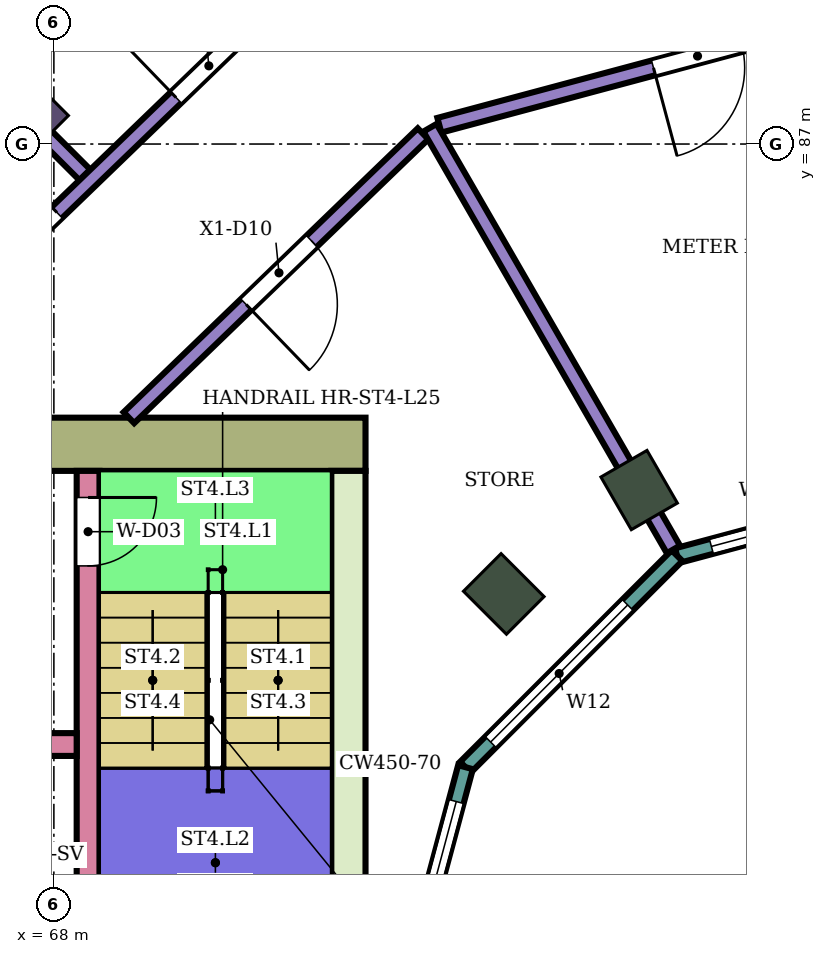
"""IFC4 building model, lengths in metres.
Left out: names, types, materials, properties, quantities, classifications, styles, units other than length and angle.
Written with IfcOpenShell. Run it as: python <this file> out.ifc"""

import sys

from ifc_helpers import new_model, si_unit, direction, frame, frame_2d, origin, origin_2d, place, context, subcontext, project, spatial, rectangle, extrude, element, fill, save


model = new_model("IFC4")
c1 = context("Model", 3, precision=1e-05, world=origin(), true_north=direction((0.0, 1.0)))
c2 = subcontext(c1, "Body", "Model", "MODEL_VIEW")
j1 = project(units=[si_unit("LENGTHUNIT", "METRE"), si_unit("PLANEANGLEUNIT", "RADIAN")], contexts=[c1])
p1 = place(None, origin())
s1 = spatial("IfcSite", under=j1, at=p1, CompositionType="ELEMENT")
p2 = place(p1, origin())
s2 = spatial("IfcBuilding", under=s1, at=p2, CompositionType="ELEMENT")
p3 = place(p2, frame((0.0, 0.0, 109.0)))
s3 = spatial("IfcBuildingStorey", under=s2, at=p3, CompositionType="ELEMENT", Elevation=109.0)
p4 = place(p3, frame((67.555, 87.445, 0.0), z_axis=(0.0, 0.0, 1.0), x_axis=(-0.707106781187, 0.707106781187, 0.0)))
e1 = element("IfcColumn", 1, at=p4, inside=s3, PredefinedType="COLUMN", context=c2, shape_type="SweptSolid", body=[
    extrude(rectangle(XDim=1.0, YDim=0.8, at=origin_2d()), origin(), (0.0, 0.0, 1.0), 5.6),
])
for number, where, z_axis, x_axis in (
    (2, (75.7, 82.448, 0.0), (0.0, 0.0, 1.0), (-0.5, 0.866, 0.0)),
    (3, (73.919, 81.081, 0.0), (0.0, 0.0, 1.0), (-0.707, 0.707, 0.0)),
):
    element("IfcColumn", number, at=place(p3, frame(where, z_axis=z_axis, x_axis=x_axis)), inside=s3, PredefinedType="COLUMN", context=c2, shape_type="SweptSolid", body=[
        extrude(rectangle(XDim=0.8, YDim=0.7, at=origin_2d()), origin(), (0.0, 0.0, 1.0), 5.6),
    ])
p5 = place(p3, frame((72.1, 83.05, 0.0), z_axis=(0.0, 0.0, 1.0), x_axis=(-1.0, 0.0, 0.0)))
e4 = element("IfcWall", 4, at=p5, inside=s3, PredefinedType="SHEAR", context=c2, shape_type="SweptSolid", body=[
    extrude(rectangle(XDim=14.8, YDim=0.7, at=frame_2d((7.4, 0.0))), origin(), (0.0, 0.0, 1.0), 5.28),
])
p6 = place(p5, frame((4.2, 0.0, 0.0)))
e5 = element("IfcOpeningElement", 5, at=p6, cuts=e4, PredefinedType="OPENING", context=c2, shape_type="SweptSolid", body=[
    extrude(rectangle(XDim=2.4, YDim=2.4, at=frame_2d((1.2, 1.2))), frame((0.0, 0.36, 0.0), z_axis=(0.0, -1.0, 0.0), x_axis=(1.0, 0.0, 0.0)), (0.0, 0.0, 1.0), 0.72),
])
p7 = place(p3, frame((71.875, 82.7, 0.0), z_axis=(0.0, 0.0, 1.0), x_axis=(0.0, -1.0, 0.0)))
e6 = element("IfcWall", 6, at=p7, inside=s3, PredefinedType="SHEAR", context=c2, shape_type="SweptSolid", body=[
    extrude(rectangle(XDim=7.7, YDim=0.45, at=frame_2d((3.85, 0.0))), origin(), (0.0, 0.0, 1.0), 5.28),
])
p8 = place(p3, frame((68.45, 82.7, 0.0), z_axis=(0.0, 0.0, 1.0), x_axis=(0.0, -1.0, 0.0)))
e7 = element("IfcWall", 7, at=p8, inside=s3, PredefinedType="SHEAR", context=c2, shape_type="SweptSolid", body=[
    extrude(rectangle(XDim=7.7, YDim=0.3, at=frame_2d((3.85, 0.0))), origin(), (0.0, 0.0, 1.0), 5.28),
])
p9 = place(p8, frame((0.35, 0.0, 0.0)))
e8 = element("IfcOpeningElement", 8, at=p9, cuts=e7, PredefinedType="OPENING", context=c2, shape_type="SweptSolid", body=[
    extrude(rectangle(XDim=0.9, YDim=2.1, at=frame_2d((0.45, 1.05))), frame((0.0, 0.16, 0.0), z_axis=(0.0, -1.0, 0.0), x_axis=(1.0, 0.0, 0.0)), (0.0, 0.0, 1.0), 0.32),
])
p10 = place(p3, frame((68.3, 79.1, 0.0), z_axis=(0.0, 0.0, 1.0), x_axis=(-1.0, 0.0, 0.0)))
e9 = element("IfcWall", 9, at=p10, inside=s3, PredefinedType="SHEAR", context=c2, shape_type="SweptSolid", body=[
    extrude(rectangle(XDim=11.0, YDim=0.3, at=frame_2d((5.5, 0.0))), origin(), (0.0, 0.0, 1.0), 5.28),
])
p11 = place(p10, frame((0.4, 0.0, 0.0)))
e10 = element("IfcOpeningElement", 10, at=p11, cuts=e9, PredefinedType="OPENING", context=c2, shape_type="SweptSolid", body=[
    extrude(rectangle(XDim=1.4, YDim=2.1, at=frame_2d((0.7, 1.05))), frame((0.0, 0.16, 0.0), z_axis=(0.0, -1.0, 0.0), x_axis=(1.0, 0.0, 0.0)), (0.0, 0.0, 1.0), 0.32),
])
p12 = place(p10, frame((5.4, 0.0, 0.0)))
e11 = element("IfcOpeningElement", 11, at=p12, cuts=e9, PredefinedType="OPENING", context=c2, shape_type="SweptSolid", body=[
    extrude(rectangle(XDim=1.4, YDim=2.1, at=frame_2d((0.7, 1.05))), frame((0.0, 0.16, 0.0), z_axis=(0.0, -1.0, 0.0), x_axis=(1.0, 0.0, 0.0)), (0.0, 0.0, 1.0), 0.32),
])
p13 = place(p10, frame((8.1, 0.0, 0.0)))
e12 = element("IfcOpeningElement", 12, at=p13, cuts=e9, PredefinedType="OPENING", context=c2, shape_type="SweptSolid", body=[
    extrude(rectangle(XDim=1.0, YDim=2.1, at=frame_2d((0.5, 1.05))), frame((0.0, 0.16, 0.0), z_axis=(0.0, -1.0, 0.0), x_axis=(1.0, 0.0, 0.0)), (0.0, 0.0, 1.0), 0.32),
])
p14 = place(p3, frame((80.0, 82.604, 0.0), z_axis=(0.0, 0.0, 1.0), x_axis=(-0.965933654434, -0.258789828301, 0.0)))
e13 = element("IfcWall", 13, at=p14, inside=s3, PredefinedType="NOTDEFINED", context=c2, shape_type="SweptSolid", body=[
    extrude(rectangle(XDim=3.936, YDim=0.2, at=frame_2d((1.968, 0.0))), origin(), (0.0, 0.0, 1.0), 5.6),
])
p15 = place(p14, frame((2.118, 0.0, 0.9)))
e14 = element("IfcOpeningElement", 14, at=p15, cuts=e13, PredefinedType="OPENING", context=c2, shape_type="SweptSolid", body=[
    extrude(rectangle(XDim=1.35, YDim=2.3, at=frame_2d((0.675, 1.15))), frame((0.0, 0.11, 0.0), z_axis=(0.0, -1.0, 0.0), x_axis=(1.0, 0.0, 0.0)), (0.0, 0.0, 1.0), 0.22),
])
p16 = place(p3, frame((76.198, 81.585, 0.0), z_axis=(0.0, 0.0, 1.0), x_axis=(-0.707106781187, -0.707106781187, 0.0)))
e15 = element("IfcWall", 15, at=p16, inside=s3, PredefinedType="NOTDEFINED", context=c2, shape_type="SweptSolid", body=[
    extrude(rectangle(XDim=3.936, YDim=0.2, at=frame_2d((1.968, 0.0))), origin(), (0.0, 0.0, 1.0), 5.6),
])
p17 = place(p16, frame((0.918, 0.0, 0.9)))
e16 = element("IfcOpeningElement", 16, at=p17, cuts=e15, PredefinedType="OPENING", context=c2, shape_type="SweptSolid", body=[
    extrude(rectangle(XDim=2.55, YDim=2.3, at=frame_2d((1.275, 1.15))), frame((0.0, 0.11, 0.0), z_axis=(0.0, -1.0, 0.0), x_axis=(1.0, 0.0, 0.0)), (0.0, 0.0, 1.0), 0.22),
])
p18 = place(p3, frame((73.415, 78.802, 0.0), z_axis=(0.0, 0.0, 1.0), x_axis=(-0.258789828301, -0.965933654434, 0.0)))
e17 = element("IfcWall", 17, at=p18, inside=s3, PredefinedType="NOTDEFINED", context=c2, shape_type="SweptSolid", body=[
    extrude(rectangle(XDim=3.936, YDim=0.2, at=frame_2d((1.968, 0.0))), origin(), (0.0, 0.0, 1.0), 5.6),
])
p19 = place(p18, frame((0.468, 0.0, 0.9)))
e18 = element("IfcOpeningElement", 18, at=p19, cuts=e17, PredefinedType="OPENING", context=c2, shape_type="SweptSolid", body=[
    extrude(rectangle(XDim=3.0, YDim=2.3, at=frame_2d((1.5, 1.15))), frame((0.0, 0.11, 0.0), z_axis=(0.0, -1.0, 0.0), x_axis=(1.0, 0.0, 0.0)), (0.0, 0.0, 1.0), 0.22),
])
p20 = place(p3, frame((63.597, 91.406, 0.0), z_axis=(0.0, 0.0, 1.0), x_axis=(0.707035026478, -0.707178528614, 0.0)))
e19 = element("IfcWall", 19, at=p20, inside=s3, PredefinedType="PARTITIONING", context=c2, shape_type="SweptSolid", body=[
    extrude(rectangle(XDim=6.805, YDim=0.2, at=frame_2d((3.403, 0.0))), origin(), (0.0, 0.0, 1.0), 5.15),
])
p21 = place(p3, frame((66.84, 84.941, 0.0), z_axis=(0.0, 0.0, 1.0), x_axis=(0.719566481028, 0.694423559062, 0.0)))
e20 = element("IfcWall", 20, at=p21, inside=s3, PredefinedType="PARTITIONING", context=c2, shape_type="SweptSolid", body=[
    extrude(rectangle(XDim=6.525, YDim=0.2, at=frame_2d((3.263, 0.0))), origin(), (0.0, 0.0, 1.0), 5.15),
])
p22 = place(p21, frame((3.846, 0.0, 0.0)))
e21 = element("IfcOpeningElement", 21, at=p22, cuts=e20, PredefinedType="OPENING", context=c2, shape_type="SweptSolid", body=[
    extrude(rectangle(XDim=1.2, YDim=2.4, at=frame_2d((0.6, 1.2))), frame((0.0, 0.11, 0.0), z_axis=(0.0, -1.0, 0.0), x_axis=(1.0, 0.0, 0.0)), (0.0, 0.0, 1.0), 0.22),
])
p23 = place(p21, frame((0.568, 0.0, 0.0)))
e22 = element("IfcOpeningElement", 22, at=p23, cuts=e20, PredefinedType="OPENING", context=c2, shape_type="SweptSolid", body=[
    extrude(rectangle(XDim=1.1, YDim=2.1, at=frame_2d((0.55, 1.05))), frame((0.0, 0.11, 0.0), z_axis=(0.0, -1.0, 0.0), x_axis=(1.0, 0.0, 0.0)), (0.0, 0.0, 1.0), 0.22),
])
p24 = place(p3, frame((68.987, 83.4, 0.0), z_axis=(0.0, 0.0, 1.0), x_axis=(0.719547721855, 0.694442996922, 0.0)))
e23 = element("IfcWall", 23, at=p24, inside=s3, PredefinedType="PARTITIONING", context=c2, shape_type="SweptSolid", body=[
    extrude(rectangle(XDim=5.378, YDim=0.2, at=frame_2d((2.689, 0.0))), origin(), (0.0, 0.0, 1.0), 5.15),
])
p25 = place(p24, frame((2.144, 0.0, 0.0)))
e24 = element("IfcOpeningElement", 24, at=p25, cuts=e23, PredefinedType="OPENING", context=c2, shape_type="SweptSolid", body=[
    extrude(rectangle(XDim=1.2, YDim=2.4, at=frame_2d((0.6, 1.2))), frame((0.0, 0.11, 0.0), z_axis=(0.0, -1.0, 0.0), x_axis=(1.0, 0.0, 0.0)), (0.0, 0.0, 1.0), 0.22),
])
p26 = place(p3, frame((73.071, 87.247, 0.0), z_axis=(0.0, 0.0, 1.0), x_axis=(0.965914318977, 0.258861987157, 0.0)))
e25 = element("IfcWall", 25, at=p26, inside=s3, PredefinedType="PARTITIONING", context=c2, shape_type="SweptSolid", body=[
    extrude(rectangle(XDim=7.043, YDim=0.2, at=frame_2d((3.521, 0.0))), origin(), (0.0, 0.0, 1.0), 5.15),
])
p27 = place(p26, frame((2.917, 0.0, 0.0)))
e26 = element("IfcOpeningElement", 26, at=p27, cuts=e25, PredefinedType="OPENING", context=c2, shape_type="SweptSolid", body=[
    extrude(rectangle(XDim=1.2, YDim=2.4, at=frame_2d((0.6, 1.2))), frame((0.0, 0.11, 0.0), z_axis=(0.0, -1.0, 0.0), x_axis=(1.0, 0.0, 0.0)), (0.0, 0.0, 1.0), 0.22),
])
p28 = place(p3, frame((72.948, 87.214, 0.0), z_axis=(0.0, 0.0, 1.0), x_axis=(0.500000701339, -0.866024998866, 0.0)))
e27 = element("IfcWall", 27, at=p28, inside=s3, PredefinedType="PARTITIONING", context=c2, shape_type="SweptSolid", body=[
    extrude(rectangle(XDim=6.405, YDim=0.2, at=frame_2d((3.203, 0.0))), origin(), (0.0, 0.0, 1.0), 5.15),
])
p29 = place(p15, origin())
e28 = element("IfcWindow", 28, at=p29, inside=s3, PartitioningType="SINGLE_PANEL", PredefinedType="WINDOW", context=c2, shape_type="SweptSolid", body=[
    extrude(rectangle(XDim=1.35, YDim=2.3, at=frame_2d((0.675, 1.15))), frame((0.0, 0.03, 0.0), z_axis=(0.0, -1.0, 0.0), x_axis=(1.0, 0.0, 0.0)), (0.0, 0.0, 1.0), 0.06),
])
fill(e14, e28)
p30 = place(p17, origin())
e29 = element("IfcWindow", 29, at=p30, inside=s3, PartitioningType="SINGLE_PANEL", PredefinedType="WINDOW", context=c2, shape_type="SweptSolid", body=[
    extrude(rectangle(XDim=2.55, YDim=2.3, at=frame_2d((1.275, 1.15))), frame((0.0, 0.03, 0.0), z_axis=(0.0, -1.0, 0.0), x_axis=(1.0, 0.0, 0.0)), (0.0, 0.0, 1.0), 0.06),
])
fill(e16, e29)
p31 = place(p19, origin())
e30 = element("IfcWindow", 30, at=p31, inside=s3, PartitioningType="SINGLE_PANEL", PredefinedType="WINDOW", context=c2, shape_type="SweptSolid", body=[
    extrude(rectangle(XDim=3.0, YDim=2.3, at=frame_2d((1.5, 1.15))), frame((0.0, 0.03, 0.0), z_axis=(0.0, -1.0, 0.0), x_axis=(1.0, 0.0, 0.0)), (0.0, 0.0, 1.0), 0.06),
])
fill(e18, e30)
p32 = place(p22, origin())
e31 = element("IfcDoor", 31, at=p32, inside=s3, OperationType="SINGLE_SWING_LEFT", PredefinedType="DOOR", context=c2, shape_type="SweptSolid", body=[
    extrude(rectangle(XDim=1.2, YDim=2.4, at=frame_2d((0.6, 1.2))), frame((0.0, 0.025, 0.0), z_axis=(0.0, -1.0, 0.0), x_axis=(1.0, 0.0, 0.0)), (0.0, 0.0, 1.0), 0.05),
])
fill(e21, e31)
p33 = place(p23, origin())
e32 = element("IfcDoor", 32, at=p33, inside=s3, OperationType="SINGLE_SWING_RIGHT", PredefinedType="DOOR", context=c2, shape_type="SweptSolid", body=[
    extrude(rectangle(XDim=1.1, YDim=2.1, at=frame_2d((0.55, 1.05))), frame((0.0, 0.025, 0.0), z_axis=(0.0, -1.0, 0.0), x_axis=(1.0, 0.0, 0.0)), (0.0, 0.0, 1.0), 0.05),
])
fill(e22, e32)
p34 = place(p27, frame((1.2, 0.0, 0.0), z_axis=(0.0, 0.0, 1.0), x_axis=(-1.0, 0.0, 0.0)))
e33 = element("IfcDoor", 33, at=p34, inside=s3, OperationType="SINGLE_SWING_RIGHT", PredefinedType="DOOR", context=c2, shape_type="SweptSolid", body=[
    extrude(rectangle(XDim=1.2, YDim=2.4, at=frame_2d((0.6, 1.2))), frame((0.0, 0.025, 0.0), z_axis=(0.0, -1.0, 0.0), x_axis=(1.0, 0.0, 0.0)), (0.0, 0.0, 1.0), 0.05),
])
fill(e26, e33)
p35 = place(p25, frame((1.2, 0.0, 0.0), z_axis=(0.0, 0.0, 1.0), x_axis=(-1.0, 0.0, 0.0)))
e34 = element("IfcDoor", 34, at=p35, inside=s3, OperationType="SINGLE_SWING_RIGHT", PredefinedType="DOOR", context=c2, shape_type="SweptSolid", body=[
    extrude(rectangle(XDim=1.2, YDim=2.4, at=frame_2d((0.6, 1.2))), frame((0.0, 0.025, 0.0), z_axis=(0.0, -1.0, 0.0), x_axis=(1.0, 0.0, 0.0)), (0.0, 0.0, 1.0), 0.05),
])
fill(e24, e34)
p36 = place(p9, origin())
e35 = element("IfcDoor", 35, at=p36, inside=s3, OperationType="SINGLE_SWING_LEFT", PredefinedType="DOOR", context=c2, shape_type="SweptSolid", body=[
    extrude(rectangle(XDim=0.9, YDim=2.1, at=frame_2d((0.45, 1.05))), frame((0.0, 0.025, 0.0), z_axis=(0.0, -1.0, 0.0), x_axis=(1.0, 0.0, 0.0)), (0.0, 0.0, 1.0), 0.05),
])
fill(e8, e35)
save(model, sys.argv[1])
